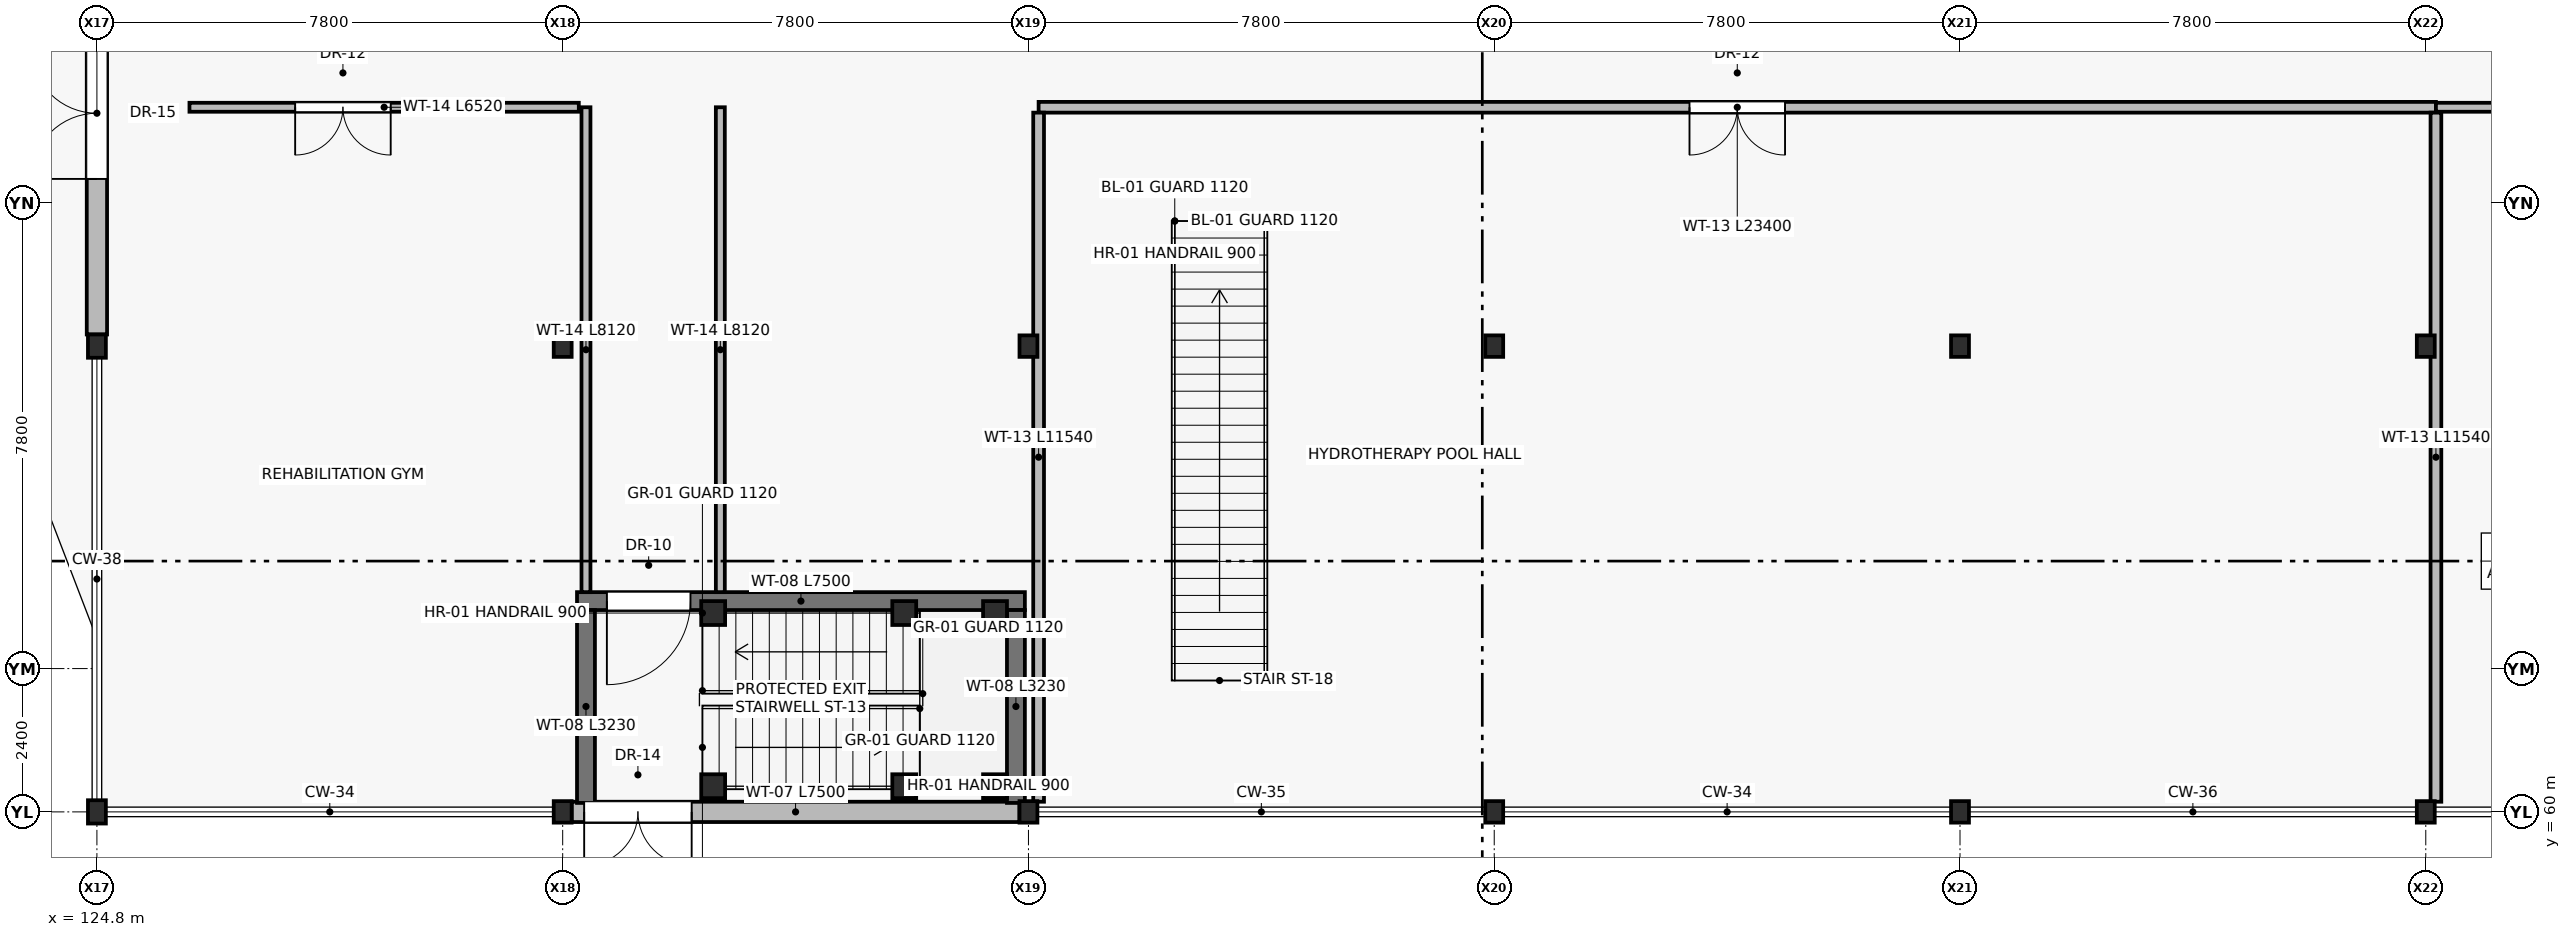
"""IFC4 building model, lengths in metres.
Left out: names, types, materials, properties, quantities, classifications, styles, units other than length and angle.
Written with IfcOpenShell. Run it as: python <this file> out.ifc"""

import sys

from ifc_helpers import new_model, si_unit, direction, frame, frame_2d, origin, origin_2d, place, context, subcontext, project, spatial, rectangle, i_section, extrude, element, fill, save


model = new_model("IFC4")
c1 = context("Model", 3, precision=1e-05, world=origin(), true_north=direction((0.0, 1.0)))
c2 = subcontext(c1, "Body", "Model", "MODEL_VIEW")
j1 = project(units=[si_unit("LENGTHUNIT", "METRE"), si_unit("PLANEANGLEUNIT", "RADIAN")], contexts=[c1])
p1 = place(None, origin())
s1 = spatial("IfcSite", under=j1, at=p1, CompositionType="ELEMENT")
p2 = place(p1, origin())
s2 = spatial("IfcBuilding", under=s1, at=p2, CompositionType="ELEMENT")
p3 = place(p2, origin())
s3 = spatial("IfcBuildingStorey", under=s2, at=p3, CompositionType="ELEMENT", Elevation=0.0)
for number, where, z_axis, x_axis in (
    (1, (124.8, 60.0, 0.0), (0.0, 0.0, 1.0), (1.0, 0.0, 0.0)),
    (2, (124.8, 67.8, 0.0), (0.0, 0.0, 1.0), (1.0, 0.0, 0.0)),
):
    element("IfcColumn", number, at=place(p3, frame(where, z_axis=z_axis, x_axis=x_axis)), inside=s3, PredefinedType="COLUMN", context=c2, shape_type="SweptSolid", body=[
        extrude(i_section(OverallWidth=0.3, OverallDepth=0.39, WebThickness=0.011, FlangeThickness=0.019, at=origin_2d()), origin(), (0.0, 0.0, 1.0), 4.8),
    ])
for number, where, z_axis, x_axis in (
    (3, (132.6, 60.0, 0.0), (0.0, 0.0, 1.0), (1.0, 0.0, 0.0)),
    (4, (132.6, 67.8, 0.0), (0.0, 0.0, 1.0), (1.0, 0.0, 0.0)),
    (5, (140.4, 60.0, 0.0), (0.0, 0.0, 1.0), (1.0, 0.0, 0.0)),
    (6, (140.4, 67.8, 0.0), (0.0, 0.0, 1.0), (1.0, 0.0, 0.0)),
    (7, (148.2, 60.0, 0.0), (0.0, 0.0, 1.0), (1.0, 0.0, 0.0)),
    (8, (148.2, 67.8, 0.0), (0.0, 0.0, 1.0), (1.0, 0.0, 0.0)),
    (9, (156.0, 60.0, 0.0), (0.0, 0.0, 1.0), (1.0, 0.0, 0.0)),
    (10, (156.0, 67.8, 0.0), (0.0, 0.0, 1.0), (1.0, 0.0, 0.0)),
    (11, (163.8, 60.0, 0.0), (0.0, 0.0, 1.0), (1.0, 0.0, 0.0)),
    (12, (163.8, 67.8, 0.0), (0.0, 0.0, 1.0), (1.0, 0.0, 0.0)),
):
    element("IfcColumn", number, at=place(p3, frame(where, z_axis=z_axis, x_axis=x_axis)), inside=s3, PredefinedType="COLUMN", context=c2, shape_type="SweptSolid", body=[
        extrude(i_section(OverallWidth=0.3, OverallDepth=0.36, WebThickness=0.012, FlangeThickness=0.022, at=origin_2d()), origin(), (0.0, 0.0, 1.0), 4.8),
    ])
for number, where, z_axis, x_axis in (
    (13, (135.12, 60.43, 0.0), (0.0, 0.0, 1.0), (1.0, 0.0, 0.0)),
    (14, (135.12, 63.33, 0.0), (0.0, 0.0, 1.0), (1.0, 0.0, 0.0)),
    (15, (138.32, 60.43, 0.0), (0.0, 0.0, 1.0), (1.0, 0.0, 0.0)),
    (16, (138.32, 63.33, 0.0), (0.0, 0.0, 1.0), (1.0, 0.0, 0.0)),
    (17, (139.84, 60.43, 0.0), (0.0, 0.0, 1.0), (1.0, 0.0, 0.0)),
    (18, (139.84, 63.33, 0.0), (0.0, 0.0, 1.0), (1.0, 0.0, 0.0)),
):
    element("IfcColumn", number, at=place(p3, frame(where, z_axis=z_axis, x_axis=x_axis)), inside=s3, PredefinedType="COLUMN", context=c2, shape_type="SweptSolid", body=[
        extrude(rectangle(XDim=0.4, YDim=0.4, at=origin_2d()), origin(), (0.0, 0.0, 1.0), 4.8),
    ])
p4 = place(p3, frame((140.25, 60.0, 0.0), z_axis=(0.0, 0.0, 1.0), x_axis=(-1.0, 0.0, 0.0)))
e19 = element("IfcWall", 19, at=p4, inside=s3, PredefinedType="STANDARD", context=c2, shape_type="SweptSolid", body=[
    extrude(rectangle(XDim=7.5, YDim=0.34, at=frame_2d((3.75, 0.0))), origin(), (0.0, 0.0, 1.0), 4.14),
])
p5 = place(p4, frame((5.49, 0.0, 0.0)))
e20 = element("IfcOpeningElement", 20, at=p5, cuts=e19, PredefinedType="OPENING", context=c2, shape_type="SweptSolid", body=[
    extrude(rectangle(XDim=1.8, YDim=2.25, at=frame_2d((0.9, 1.125))), frame((0.0, 0.18, 0.0), z_axis=(0.0, -1.0, 0.0), x_axis=(1.0, 0.0, 0.0)), (0.0, 0.0, 1.0), 0.36),
])
p6 = place(p3, frame((124.8, 67.995, 0.0), z_axis=(0.0, 0.0, 1.0), x_axis=(0.0, 1.0, 0.0)))
e21 = element("IfcWall", 21, at=p6, inside=s3, PredefinedType="STANDARD", context=c2, shape_type="SweptSolid", body=[
    extrude(rectangle(XDim=7.41, YDim=0.34, at=frame_2d((3.705, 0.0))), origin(), (0.0, 0.0, 1.0), 4.14),
])
p7 = place(p6, frame((2.605, 0.0, 0.0)))
e22 = element("IfcOpeningElement", 22, at=p7, cuts=e21, PredefinedType="OPENING", context=c2, shape_type="SweptSolid", body=[
    extrude(rectangle(XDim=2.2, YDim=2.4, at=frame_2d((1.1, 1.2))), frame((0.0, 0.18, 0.0), z_axis=(0.0, -1.0, 0.0), x_axis=(1.0, 0.0, 0.0)), (0.0, 0.0, 1.0), 0.36),
])
p8 = place(p3, frame((140.34, 63.53, 0.0), z_axis=(0.0, 0.0, 1.0), x_axis=(-1.0, 0.0, 0.0)))
e23 = element("IfcWall", 23, at=p8, inside=s3, PredefinedType="SHEAR", context=c2, shape_type="SweptSolid", body=[
    extrude(rectangle(XDim=7.5, YDim=0.3, at=frame_2d((3.75, 0.0))), origin(), (0.0, 0.0, 1.0), 4.54),
])
p9 = place(p8, frame((5.6, 0.0, 0.0)))
e24 = element("IfcOpeningElement", 24, at=p9, cuts=e23, PredefinedType="OPENING", context=c2, shape_type="SweptSolid", body=[
    extrude(rectangle(XDim=1.4, YDim=2.2, at=frame_2d((0.7, 1.1))), frame((0.0, 0.16, 0.0), z_axis=(0.0, -1.0, 0.0), x_axis=(1.0, 0.0, 0.0)), (0.0, 0.0, 1.0), 0.32),
])
for number, where, z_axis, x_axis in (
    (25, (132.99, 63.38, 0.0), (0.0, 0.0, 1.0), (0.0, -1.0, 0.0)),
    (26, (140.19, 60.15, 0.0), (0.0, 0.0, 1.0), (0.0, 1.0, 0.0)),
):
    element("IfcWall", number, at=place(p3, frame(where, z_axis=z_axis, x_axis=x_axis)), inside=s3, PredefinedType="SHEAR", context=c2, shape_type="SweptSolid", body=[
        extrude(rectangle(XDim=3.23, YDim=0.3, at=frame_2d((1.615, 0.0))), origin(), (0.0, 0.0, 1.0), 4.54),
    ])
p10 = place(p3, frame((132.99, 63.68, 0.0), z_axis=(0.0, 0.0, 1.0), x_axis=(0.0, 1.0, 0.0)))
e27 = element("IfcWall", 27, at=p10, inside=s3, PredefinedType="PARTITIONING", context=c2, shape_type="SweptSolid", body=[
    extrude(rectangle(XDim=8.12, YDim=0.15, at=frame_2d((4.06, 0.0))), origin(), (0.0, 0.0, 1.0), 4.14),
])
p11 = place(p3, frame((135.24, 63.68, 0.0), z_axis=(0.0, 0.0, 1.0), x_axis=(0.0, 1.0, 0.0)))
e28 = element("IfcWall", 28, at=p11, inside=s3, PredefinedType="PARTITIONING", context=c2, shape_type="SweptSolid", body=[
    extrude(rectangle(XDim=8.12, YDim=0.15, at=frame_2d((4.06, 0.0))), origin(), (0.0, 0.0, 1.0), 4.21),
])
p12 = place(p3, frame((132.87, 71.8, 0.0), z_axis=(0.0, 0.0, 1.0), x_axis=(-1.0, 0.0, 0.0)))
e29 = element("IfcWall", 29, at=p12, inside=s3, PredefinedType="PARTITIONING", context=c2, shape_type="SweptSolid", body=[
    extrude(rectangle(XDim=6.52, YDim=0.15, at=frame_2d((3.26, 0.0))), origin(), (0.0, 0.0, 1.0), 4.54),
])
p13 = place(p12, frame((3.15, 0.0, 0.0)))
e30 = element("IfcOpeningElement", 30, at=p13, cuts=e29, PredefinedType="OPENING", context=c2, shape_type="SweptSolid", body=[
    extrude(rectangle(XDim=1.6, YDim=2.2, at=frame_2d((0.8, 1.1))), frame((0.0, 0.085, 0.0), z_axis=(0.0, -1.0, 0.0), x_axis=(1.0, 0.0, 0.0)), (0.0, 0.0, 1.0), 0.17),
])
p14 = place(p3, frame((163.97, 71.8, 0.0), z_axis=(0.0, 0.0, 1.0), x_axis=(-1.0, 0.0, 0.0)))
e31 = element("IfcWall", 31, at=p14, inside=s3, PredefinedType="PARTITIONING", context=c2, shape_type="SweptSolid", body=[
    extrude(rectangle(XDim=23.4, YDim=0.18, at=frame_2d((11.7, 0.0))), origin(), (0.0, 0.0, 1.0), 4.54),
])
p15 = place(p14, frame((10.9, 0.0, 0.0)))
e32 = element("IfcOpeningElement", 32, at=p15, cuts=e31, PredefinedType="OPENING", context=c2, shape_type="SweptSolid", body=[
    extrude(rectangle(XDim=1.6, YDim=2.2, at=frame_2d((0.8, 1.1))), frame((0.0, 0.1, 0.0), z_axis=(0.0, -1.0, 0.0), x_axis=(1.0, 0.0, 0.0)), (0.0, 0.0, 1.0), 0.2),
])
p16 = place(p3, frame((167.83, 71.8, 0.0), z_axis=(0.0, 0.0, 1.0), x_axis=(-1.0, 0.0, 0.0)))
e33 = element("IfcWall", 33, at=p16, inside=s3, PredefinedType="PARTITIONING", context=c2, shape_type="SweptSolid", body=[
    extrude(rectangle(XDim=3.86, YDim=0.15, at=frame_2d((1.93, 0.0))), origin(), (0.0, 0.0, 1.0), 4.54),
])
p17 = place(p16, frame((1.33, 0.0, 0.0)))
e34 = element("IfcOpeningElement", 34, at=p17, cuts=e33, PredefinedType="OPENING", context=c2, shape_type="SweptSolid", body=[
    extrude(rectangle(XDim=1.2, YDim=2.2, at=frame_2d((0.6, 1.1))), frame((0.0, 0.085, 0.0), z_axis=(0.0, -1.0, 0.0), x_axis=(1.0, 0.0, 0.0)), (0.0, 0.0, 1.0), 0.17),
])
for number, where, z_axis, x_axis in (
    (35, (140.57, 60.17, 0.0), (0.0, 0.0, 1.0), (0.0, 1.0, 0.0)),
    (36, (163.97, 60.17, 0.0), (0.0, 0.0, 1.0), (0.0, 1.0, 0.0)),
):
    element("IfcWall", number, at=place(p3, frame(where, z_axis=z_axis, x_axis=x_axis)), inside=s3, PredefinedType="PARTITIONING", context=c2, shape_type="SweptSolid", body=[
        extrude(rectangle(XDim=11.54, YDim=0.18, at=frame_2d((5.77, 0.0))), origin(), (0.0, 0.0, 1.0), 4.09),
    ])
p18 = place(p5, origin())
e37 = element("IfcDoor", 37, at=p18, inside=s3, OperationType="DOUBLE_DOOR_SINGLE_SWING", PredefinedType="DOOR", context=c2, shape_type="SweptSolid", body=[
    extrude(rectangle(XDim=1.8, YDim=2.25, at=frame_2d((0.9, 1.125))), frame((0.0, 0.025, 0.0), z_axis=(0.0, -1.0, 0.0), x_axis=(1.0, 0.0, 0.0)), (0.0, 0.0, 1.0), 0.05),
])
fill(e20, e37)
p19 = place(p7, origin())
e38 = element("IfcDoor", 38, at=p19, inside=s3, OperationType="DOUBLE_DOOR_SINGLE_SWING", PredefinedType="DOOR", context=c2, shape_type="SweptSolid", body=[
    extrude(rectangle(XDim=2.2, YDim=2.4, at=frame_2d((1.1, 1.2))), frame((0.0, 0.025, 0.0), z_axis=(0.0, -1.0, 0.0), x_axis=(1.0, 0.0, 0.0)), (0.0, 0.0, 1.0), 0.05),
])
fill(e22, e38)
p20 = place(p9, origin())
e39 = element("IfcDoor", 39, at=p20, inside=s3, OperationType="SINGLE_SWING_RIGHT", PredefinedType="DOOR", context=c2, shape_type="SweptSolid", body=[
    extrude(rectangle(XDim=1.4, YDim=2.2, at=frame_2d((0.7, 1.1))), frame((0.0, 0.025, 0.0), z_axis=(0.0, -1.0, 0.0), x_axis=(1.0, 0.0, 0.0)), (0.0, 0.0, 1.0), 0.05),
])
fill(e24, e39)
p21 = place(p13, origin())
e40 = element("IfcDoor", 40, at=p21, inside=s3, OperationType="DOUBLE_DOOR_SINGLE_SWING", PredefinedType="DOOR", context=c2, shape_type="SweptSolid", body=[
    extrude(rectangle(XDim=1.6, YDim=2.2, at=frame_2d((0.8, 1.1))), frame((0.0, 0.025, 0.0), z_axis=(0.0, -1.0, 0.0), x_axis=(1.0, 0.0, 0.0)), (0.0, 0.0, 1.0), 0.05),
])
fill(e30, e40)
p22 = place(p15, origin())
e41 = element("IfcDoor", 41, at=p22, inside=s3, OperationType="DOUBLE_DOOR_SINGLE_SWING", PredefinedType="DOOR", context=c2, shape_type="SweptSolid", body=[
    extrude(rectangle(XDim=1.6, YDim=2.2, at=frame_2d((0.8, 1.1))), frame((0.0, 0.025, 0.0), z_axis=(0.0, -1.0, 0.0), x_axis=(1.0, 0.0, 0.0)), (0.0, 0.0, 1.0), 0.05),
])
fill(e32, e41)
save(model, sys.argv[1])
